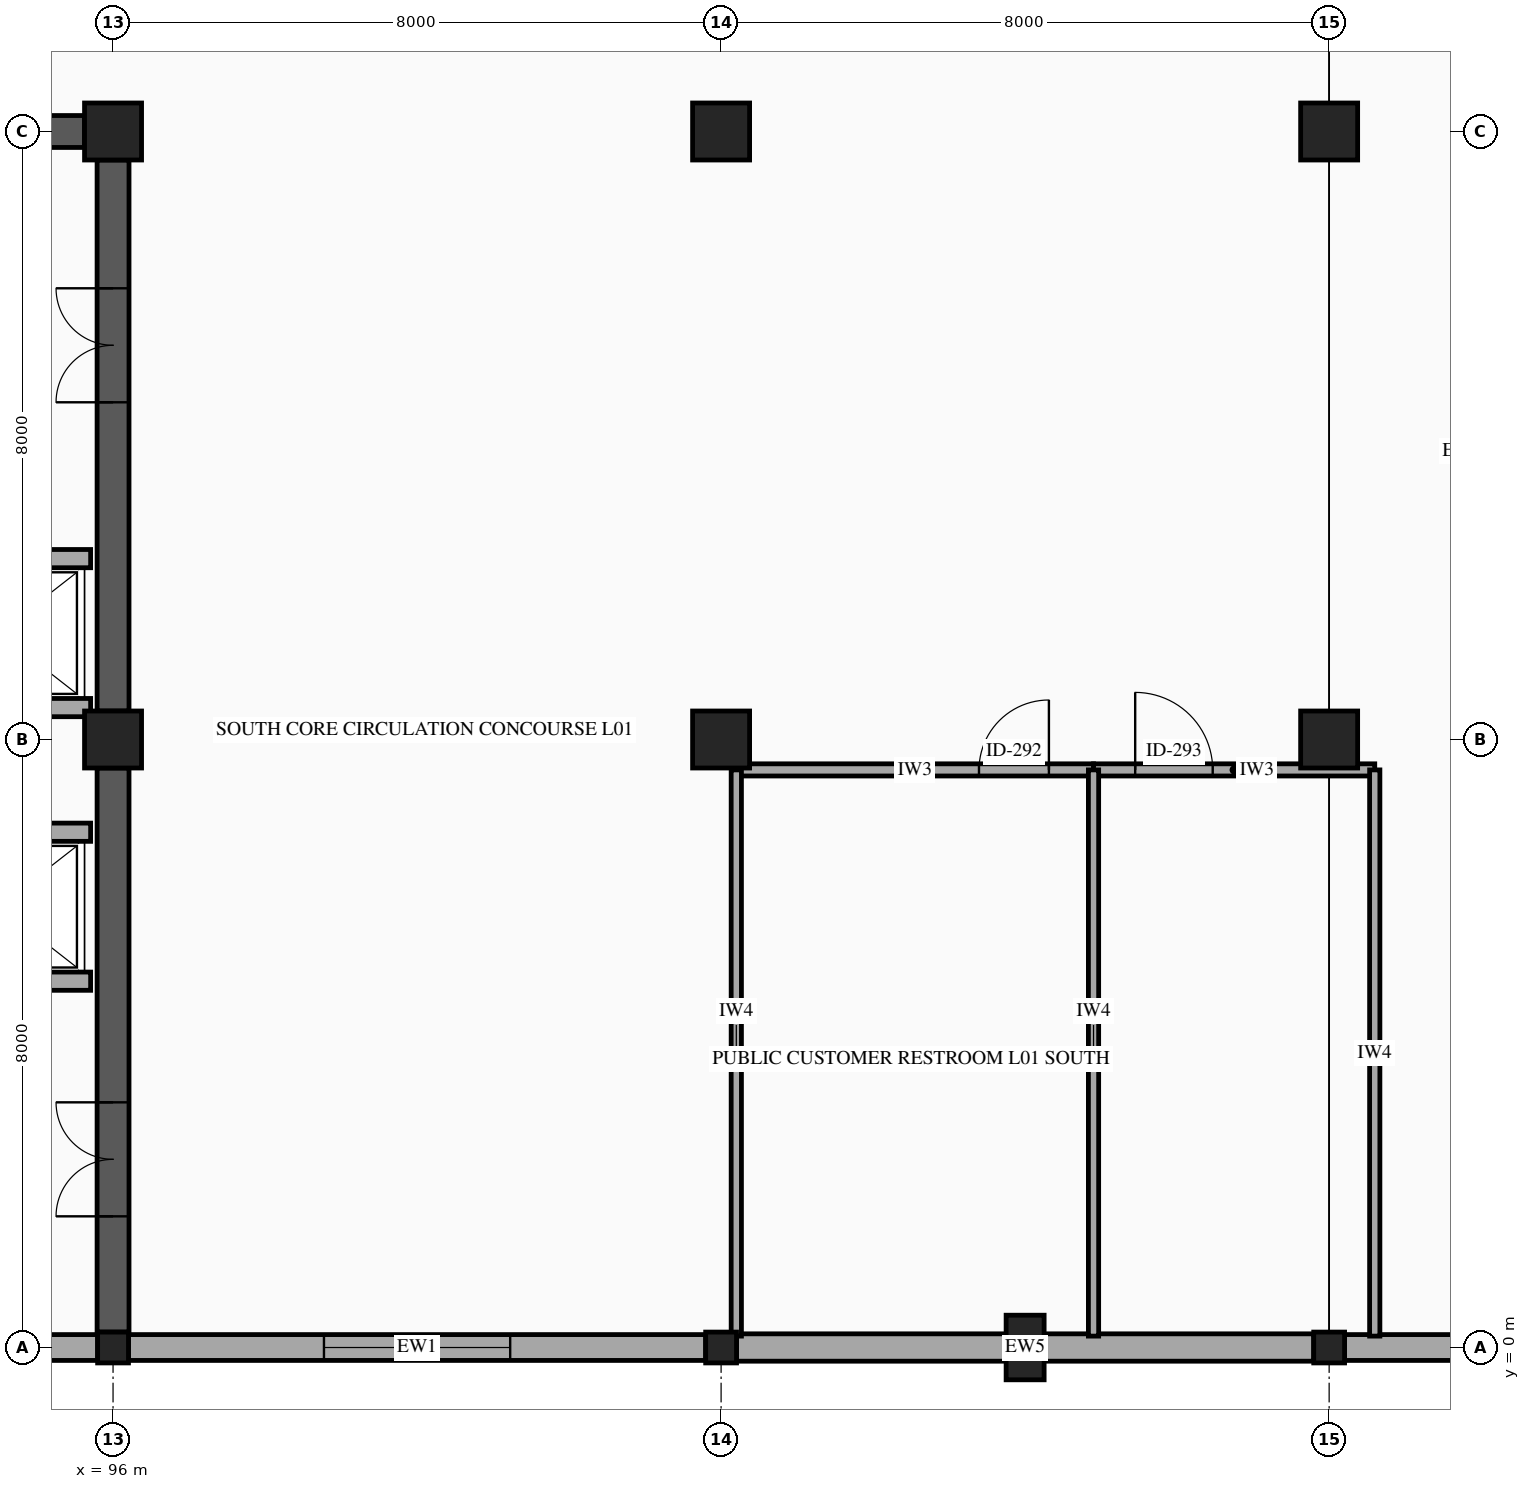
"""IFC4 building model, lengths in metres.
Left out: names, types, materials, properties, quantities, classifications, styles, units other than length and angle.
Written with IfcOpenShell. Run it as: python <this file> out.ifc"""

import sys

from ifc_helpers import new_model, si_unit, direction, frame, frame_2d, origin, origin_2d, place, context, subcontext, project, spatial, rectangle, hollow_rectangle, extrude, element, fill, save


model = new_model("IFC4")
c1 = context("Model", 3, precision=1e-05, world=origin(), true_north=direction((0.0, 1.0)))
c2 = subcontext(c1, "Body", "Model", "MODEL_VIEW")
j1 = project(units=[si_unit("LENGTHUNIT", "METRE"), si_unit("PLANEANGLEUNIT", "RADIAN")], contexts=[c1])
p1 = place(None, origin())
s1 = spatial("IfcSite", under=j1, at=p1, CompositionType="ELEMENT")
p2 = place(p1, origin())
s2 = spatial("IfcBuilding", under=s1, at=p2, CompositionType="ELEMENT")
p3 = place(p2, frame((0.0, 0.0, 5.6)))
s3 = spatial("IfcBuildingStorey", under=s2, at=p3, CompositionType="ELEMENT", Elevation=5.6)
p4 = place(p3, frame((96.0, 0.0, 0.0), z_axis=(0.0, 0.0, 1.0), x_axis=(1.0, 0.0, 0.0)))
e1 = element("IfcColumn", 1, at=p4, inside=s3, PredefinedType="COLUMN", context=c2, shape_type="SweptSolid", body=[
    extrude(hollow_rectangle(XDim=0.406, YDim=0.406, WallThickness=0.015, InnerFilletRadius=0.015, OuterFilletRadius=0.029, at=origin_2d()), origin(), (0.0, 0.0, 1.0), 4.8),
])
for number, where, z_axis, x_axis in (
    (2, (96.0, 8.0, 0.0), (0.0, 0.0, 1.0), (1.0, 0.0, 0.0)),
    (3, (96.0, 16.0, 0.0), (0.0, 0.0, 1.0), (1.0, 0.0, 0.0)),
):
    element("IfcColumn", number, at=place(p3, frame(where, z_axis=z_axis, x_axis=x_axis)), inside=s3, PredefinedType="COLUMN", context=c2, shape_type="SweptSolid", body=[
        extrude(rectangle(XDim=0.75, YDim=0.75, at=origin_2d()), origin(), (0.0, 0.0, 1.0), 4.8),
    ])
p5 = place(p3, frame((104.0, 0.0, 0.0), z_axis=(0.0, 0.0, 1.0), x_axis=(1.0, 0.0, 0.0)))
e4 = element("IfcColumn", 4, at=p5, inside=s3, PredefinedType="COLUMN", context=c2, shape_type="SweptSolid", body=[
    extrude(hollow_rectangle(XDim=0.406, YDim=0.406, WallThickness=0.015, InnerFilletRadius=0.015, OuterFilletRadius=0.029, at=origin_2d()), origin(), (0.0, 0.0, 1.0), 4.8),
])
for number, where, z_axis, x_axis in (
    (5, (104.0, 8.0, 0.0), (0.0, 0.0, 1.0), (1.0, 0.0, 0.0)),
    (6, (104.0, 16.0, 0.0), (0.0, 0.0, 1.0), (1.0, 0.0, 0.0)),
):
    element("IfcColumn", number, at=place(p3, frame(where, z_axis=z_axis, x_axis=x_axis)), inside=s3, PredefinedType="COLUMN", context=c2, shape_type="SweptSolid", body=[
        extrude(rectangle(XDim=0.75, YDim=0.75, at=origin_2d()), origin(), (0.0, 0.0, 1.0), 4.8),
    ])
p6 = place(p3, frame((112.0, 0.0, 0.0), z_axis=(0.0, 0.0, 1.0), x_axis=(1.0, 0.0, 0.0)))
e7 = element("IfcColumn", 7, at=p6, inside=s3, PredefinedType="COLUMN", context=c2, shape_type="SweptSolid", body=[
    extrude(hollow_rectangle(XDim=0.406, YDim=0.406, WallThickness=0.015, InnerFilletRadius=0.015, OuterFilletRadius=0.029, at=origin_2d()), origin(), (0.0, 0.0, 1.0), 4.8),
])
for number, where, z_axis, x_axis in (
    (8, (112.0, 8.0, 0.0), (0.0, 0.0, 1.0), (1.0, 0.0, 0.0)),
    (9, (112.0, 16.0, 0.0), (0.0, 0.0, 1.0), (1.0, 0.0, 0.0)),
):
    element("IfcColumn", number, at=place(p3, frame(where, z_axis=z_axis, x_axis=x_axis)), inside=s3, PredefinedType="COLUMN", context=c2, shape_type="SweptSolid", body=[
        extrude(rectangle(XDim=0.75, YDim=0.75, at=origin_2d()), origin(), (0.0, 0.0, 1.0), 4.8),
    ])
p7 = place(p3, frame((108.0, 0.0, 0.0), z_axis=(0.0, 0.0, 1.0), x_axis=(1.0, 0.0, 0.0)))
e10 = element("IfcColumn", 10, at=p7, inside=s3, PredefinedType="PILASTER", context=c2, shape_type="SweptSolid", body=[
    extrude(rectangle(XDim=0.5, YDim=0.85, at=origin_2d()), origin(), (0.0, 0.0, 1.0), 4.8),
])
p8 = place(p3, frame((119.797, 0.0, 0.0), z_axis=(0.0, 0.0, 1.0), x_axis=(-1.0, 0.0, 0.0)))
e11 = element("IfcWall", 11, at=p8, inside=s3, PredefinedType="STANDARD", context=c2, shape_type="SweptSolid", body=[
    extrude(rectangle(XDim=7.594, YDim=0.34, at=frame_2d((3.797, 0.0))), origin(), (0.0, 0.0, 1.0), 3.78),
])
p9 = place(p8, frame((2.572, 0.0, 0.8)))
e12 = element("IfcOpeningElement", 12, at=p9, cuts=e11, PredefinedType="OPENING", context=c2, shape_type="SweptSolid", body=[
    extrude(rectangle(XDim=2.45, YDim=1.85, at=frame_2d((1.225, 0.925))), frame((0.0, 0.18, 0.0), z_axis=(0.0, -1.0, 0.0), x_axis=(1.0, 0.0, 0.0)), (0.0, 0.0, 1.0), 0.36),
])
p10 = place(p3, frame((111.797, 0.0, 0.0), z_axis=(0.0, 0.0, 1.0), x_axis=(-1.0, 0.0, 0.0)))
e13 = element("IfcWall", 13, at=p10, inside=s3, PredefinedType="SOLIDWALL", context=c2, shape_type="SweptSolid", body=[
    extrude(rectangle(XDim=7.594, YDim=0.36, at=frame_2d((3.797, 0.0))), origin(), (0.0, 0.0, 1.0), 3.78),
])
p11 = place(p3, frame((103.797, 0.0, 0.0), z_axis=(0.0, 0.0, 1.0), x_axis=(-1.0, 0.0, 0.0)))
e14 = element("IfcWall", 14, at=p11, inside=s3, PredefinedType="STANDARD", context=c2, shape_type="SweptSolid", body=[
    extrude(rectangle(XDim=7.594, YDim=0.34, at=frame_2d((3.797, 0.0))), origin(), (0.0, 0.0, 1.0), 3.78),
])
p12 = place(p11, frame((2.572, 0.0, 0.8)))
e15 = element("IfcOpeningElement", 15, at=p12, cuts=e14, PredefinedType="OPENING", context=c2, shape_type="SweptSolid", body=[
    extrude(rectangle(XDim=2.45, YDim=1.85, at=frame_2d((1.225, 0.925))), frame((0.0, 0.18, 0.0), z_axis=(0.0, -1.0, 0.0), x_axis=(1.0, 0.0, 0.0)), (0.0, 0.0, 1.0), 0.36),
])
p13 = place(p3, frame((95.797, 0.0, 0.0), z_axis=(0.0, 0.0, 1.0), x_axis=(-1.0, 0.0, 0.0)))
e16 = element("IfcWall", 16, at=p13, inside=s3, PredefinedType="STANDARD", context=c2, shape_type="SweptSolid", body=[
    extrude(rectangle(XDim=7.594, YDim=0.34, at=frame_2d((3.797, 0.0))), origin(), (0.0, 0.0, 1.0), 3.78),
])
p14 = place(p3, frame((88.375, 16.0, 0.0), z_axis=(0.0, 0.0, 1.0), x_axis=(1.0, 0.0, 0.0)))
e17 = element("IfcWall", 17, at=p14, inside=s3, PredefinedType="SHEAR", context=c2, shape_type="SweptSolid", body=[
    extrude(rectangle(XDim=7.25, YDim=0.42, at=frame_2d((3.625, 0.0))), origin(), (0.0, 0.0, 1.0), 4.58),
])
p15 = place(p14, frame((2.875, 0.0, 0.0)))
e18 = element("IfcOpeningElement", 18, at=p15, cuts=e17, PredefinedType="OPENING", context=c2, shape_type="SweptSolid", body=[
    extrude(rectangle(XDim=1.5, YDim=2.15, at=frame_2d((0.75, 1.075))), frame((0.0, 0.22, 0.0), z_axis=(0.0, -1.0, 0.0), x_axis=(1.0, 0.0, 0.0)), (0.0, 0.0, 1.0), 0.44),
])
p16 = place(p3, frame((96.0, 0.203, 0.0), z_axis=(0.0, 0.0, 1.0), x_axis=(0.0, 1.0, 0.0)))
e19 = element("IfcWall", 19, at=p16, inside=s3, PredefinedType="SHEAR", context=c2, shape_type="SweptSolid", body=[
    extrude(rectangle(XDim=7.422, YDim=0.42, at=frame_2d((3.711, 0.0))), origin(), (0.0, 0.0, 1.0), 4.58),
])
p17 = place(p16, frame((1.523, 0.0, 0.0)))
e20 = element("IfcOpeningElement", 20, at=p17, cuts=e19, PredefinedType="OPENING", context=c2, shape_type="SweptSolid", body=[
    extrude(rectangle(XDim=1.5, YDim=2.15, at=frame_2d((0.75, 1.075))), frame((0.0, 0.22, 0.0), z_axis=(0.0, -1.0, 0.0), x_axis=(1.0, 0.0, 0.0)), (0.0, 0.0, 1.0), 0.44),
])
p18 = place(p3, frame((96.0, 8.375, 0.0), z_axis=(0.0, 0.0, 1.0), x_axis=(0.0, 1.0, 0.0)))
e21 = element("IfcWall", 21, at=p18, inside=s3, PredefinedType="SHEAR", context=c2, shape_type="SweptSolid", body=[
    extrude(rectangle(XDim=7.25, YDim=0.42, at=frame_2d((3.625, 0.0))), origin(), (0.0, 0.0, 1.0), 4.58),
])
p19 = place(p18, frame((4.062, 0.0, 0.0)))
e22 = element("IfcOpeningElement", 22, at=p19, cuts=e21, PredefinedType="OPENING", context=c2, shape_type="SweptSolid", body=[
    extrude(rectangle(XDim=1.5, YDim=2.15, at=frame_2d((0.75, 1.075))), frame((0.0, 0.22, 0.0), z_axis=(0.0, -1.0, 0.0), x_axis=(1.0, 0.0, 0.0)), (0.0, 0.0, 1.0), 0.44),
])
p20 = place(p3, frame((93.295, 6.78, 0.0), z_axis=(0.0, 0.0, 1.0), x_axis=(1.0, 0.0, 0.0)))
e23 = element("IfcWall", 23, at=p20, inside=s3, PredefinedType="PARTITIONING", context=c2, shape_type="SweptSolid", body=[
    extrude(rectangle(XDim=2.41, YDim=0.24, at=frame_2d((1.205, 0.0))), origin(), (0.0, 0.0, 1.0), 4.58),
])
p21 = place(p20, frame((0.655, 0.0, 0.0)))
e24 = element("IfcOpeningElement", 24, at=p21, cuts=e23, PredefinedType="OPENING", context=c2, shape_type="SweptSolid", body=[
    extrude(rectangle(XDim=1.1, YDim=2.15, at=frame_2d((0.55, 1.075))), frame((0.0, 0.13, 0.0), z_axis=(0.0, -1.0, 0.0), x_axis=(1.0, 0.0, 0.0)), (0.0, 0.0, 1.0), 0.26),
])
p22 = place(p3, frame((93.295, 4.82, 0.0), z_axis=(0.0, 0.0, 1.0), x_axis=(1.0, 0.0, 0.0)))
e25 = element("IfcWall", 25, at=p22, inside=s3, PredefinedType="PARTITIONING", context=c2, shape_type="SweptSolid", body=[
    extrude(rectangle(XDim=2.41, YDim=0.24, at=frame_2d((1.205, 0.0))), origin(), (0.0, 0.0, 1.0), 4.58),
])
p23 = place(p3, frame((93.295, 10.38, 0.0), z_axis=(0.0, 0.0, 1.0), x_axis=(1.0, 0.0, 0.0)))
e26 = element("IfcWall", 26, at=p23, inside=s3, PredefinedType="PARTITIONING", context=c2, shape_type="SweptSolid", body=[
    extrude(rectangle(XDim=2.41, YDim=0.24, at=frame_2d((1.205, 0.0))), origin(), (0.0, 0.0, 1.0), 4.58),
])
p24 = place(p23, frame((0.655, 0.0, 0.0)))
e27 = element("IfcOpeningElement", 27, at=p24, cuts=e26, PredefinedType="OPENING", context=c2, shape_type="SweptSolid", body=[
    extrude(rectangle(XDim=1.1, YDim=2.15, at=frame_2d((0.55, 1.075))), frame((0.0, 0.13, 0.0), z_axis=(0.0, -1.0, 0.0), x_axis=(1.0, 0.0, 0.0)), (0.0, 0.0, 1.0), 0.26),
])
p25 = place(p3, frame((93.295, 8.42, 0.0), z_axis=(0.0, 0.0, 1.0), x_axis=(1.0, 0.0, 0.0)))
e28 = element("IfcWall", 28, at=p25, inside=s3, PredefinedType="PARTITIONING", context=c2, shape_type="SweptSolid", body=[
    extrude(rectangle(XDim=2.41, YDim=0.24, at=frame_2d((1.205, 0.0))), origin(), (0.0, 0.0, 1.0), 4.58),
])
p26 = place(p3, frame((104.2, 7.6, 0.0), z_axis=(0.0, 0.0, 1.0), x_axis=(1.0, 0.0, 0.0)))
e29 = element("IfcWall", 29, at=p26, inside=s3, PredefinedType="PARTITIONING", context=c2, shape_type="SweptSolid", body=[
    extrude(rectangle(XDim=4.7, YDim=0.16, at=frame_2d((2.35, 0.0))), origin(), (0.0, 0.0, 1.0), 3.78),
])
p27 = place(p26, frame((3.193, 0.0, 0.0)))
e30 = element("IfcOpeningElement", 30, at=p27, cuts=e29, PredefinedType="OPENING", context=c2, shape_type="SweptSolid", body=[
    extrude(rectangle(XDim=0.92, YDim=2.1, at=frame_2d((0.46, 1.05))), frame((0.0, 0.09, 0.0), z_axis=(0.0, -1.0, 0.0), x_axis=(1.0, 0.0, 0.0)), (0.0, 0.0, 1.0), 0.18),
])
p28 = place(p3, frame((108.9, 7.6, 0.0), z_axis=(0.0, 0.0, 1.0), x_axis=(1.0, 0.0, 0.0)))
e31 = element("IfcWall", 31, at=p28, inside=s3, PredefinedType="PARTITIONING", context=c2, shape_type="SweptSolid", body=[
    extrude(rectangle(XDim=3.7, YDim=0.16, at=frame_2d((1.85, 0.0))), origin(), (0.0, 0.0, 1.0), 3.78),
])
p29 = place(p28, frame((0.548, 0.0, 0.0)))
e32 = element("IfcOpeningElement", 32, at=p29, cuts=e31, PredefinedType="OPENING", context=c2, shape_type="SweptSolid", body=[
    extrude(rectangle(XDim=1.02, YDim=2.1, at=frame_2d((0.51, 1.05))), frame((0.0, 0.09, 0.0), z_axis=(0.0, -1.0, 0.0), x_axis=(1.0, 0.0, 0.0)), (0.0, 0.0, 1.0), 0.18),
])
for number, where, z_axis, x_axis in (
    (33, (104.2, 0.15, 0.0), (0.0, 0.0, 1.0), (0.0, 1.0, 0.0)),
    (34, (108.9, 0.15, 0.0), (0.0, 0.0, 1.0), (0.0, 1.0, 0.0)),
    (35, (112.6, 0.15, 0.0), (0.0, 0.0, 1.0), (0.0, 1.0, 0.0)),
):
    element("IfcWall", number, at=place(p3, frame(where, z_axis=z_axis, x_axis=x_axis)), inside=s3, PredefinedType="PARTITIONING", context=c2, shape_type="SweptSolid", body=[
        extrude(rectangle(XDim=7.45, YDim=0.135, at=frame_2d((3.725, 0.0))), origin(), (0.0, 0.0, 1.0), 3.78),
    ])
p30 = place(p12, origin())
e36 = element("IfcWindow", 36, at=p30, inside=s3, PartitioningType="DOUBLE_PANEL_VERTICAL", PredefinedType="WINDOW", context=c2, shape_type="SweptSolid", body=[
    extrude(rectangle(XDim=2.45, YDim=1.85, at=frame_2d((1.225, 0.925))), frame((0.0, 0.03, 0.0), z_axis=(0.0, -1.0, 0.0), x_axis=(1.0, 0.0, 0.0)), (0.0, 0.0, 1.0), 0.06),
])
fill(e15, e36)
p31 = place(p17, origin())
e37 = element("IfcDoor", 37, at=p31, inside=s3, OperationType="DOUBLE_DOOR_SINGLE_SWING", PredefinedType="DOOR", context=c2, shape_type="SweptSolid", body=[
    extrude(rectangle(XDim=1.5, YDim=2.15, at=frame_2d((0.75, 1.075))), frame((0.0, 0.025, 0.0), z_axis=(0.0, -1.0, 0.0), x_axis=(1.0, 0.0, 0.0)), (0.0, 0.0, 1.0), 0.05),
])
fill(e20, e37)
p32 = place(p19, origin())
e38 = element("IfcDoor", 38, at=p32, inside=s3, OperationType="DOUBLE_DOOR_SINGLE_SWING", PredefinedType="DOOR", context=c2, shape_type="SweptSolid", body=[
    extrude(rectangle(XDim=1.5, YDim=2.15, at=frame_2d((0.75, 1.075))), frame((0.0, 0.025, 0.0), z_axis=(0.0, -1.0, 0.0), x_axis=(1.0, 0.0, 0.0)), (0.0, 0.0, 1.0), 0.05),
])
fill(e22, e38)
p33 = place(p27, origin())
e39 = element("IfcDoor", 39, at=p33, inside=s3, OperationType="SINGLE_SWING_RIGHT", PredefinedType="DOOR", context=c2, shape_type="SweptSolid", body=[
    extrude(rectangle(XDim=0.92, YDim=2.1, at=frame_2d((0.46, 1.05))), frame((0.0, 0.025, 0.0), z_axis=(0.0, -1.0, 0.0), x_axis=(1.0, 0.0, 0.0)), (0.0, 0.0, 1.0), 0.05),
])
fill(e30, e39)
p34 = place(p29, origin())
e40 = element("IfcDoor", 40, at=p34, inside=s3, OperationType="SINGLE_SWING_LEFT", PredefinedType="DOOR", context=c2, shape_type="SweptSolid", body=[
    extrude(rectangle(XDim=1.02, YDim=2.1, at=frame_2d((0.51, 1.05))), frame((0.0, 0.025, 0.0), z_axis=(0.0, -1.0, 0.0), x_axis=(1.0, 0.0, 0.0)), (0.0, 0.0, 1.0), 0.05),
])
fill(e32, e40)
save(model, sys.argv[1])
